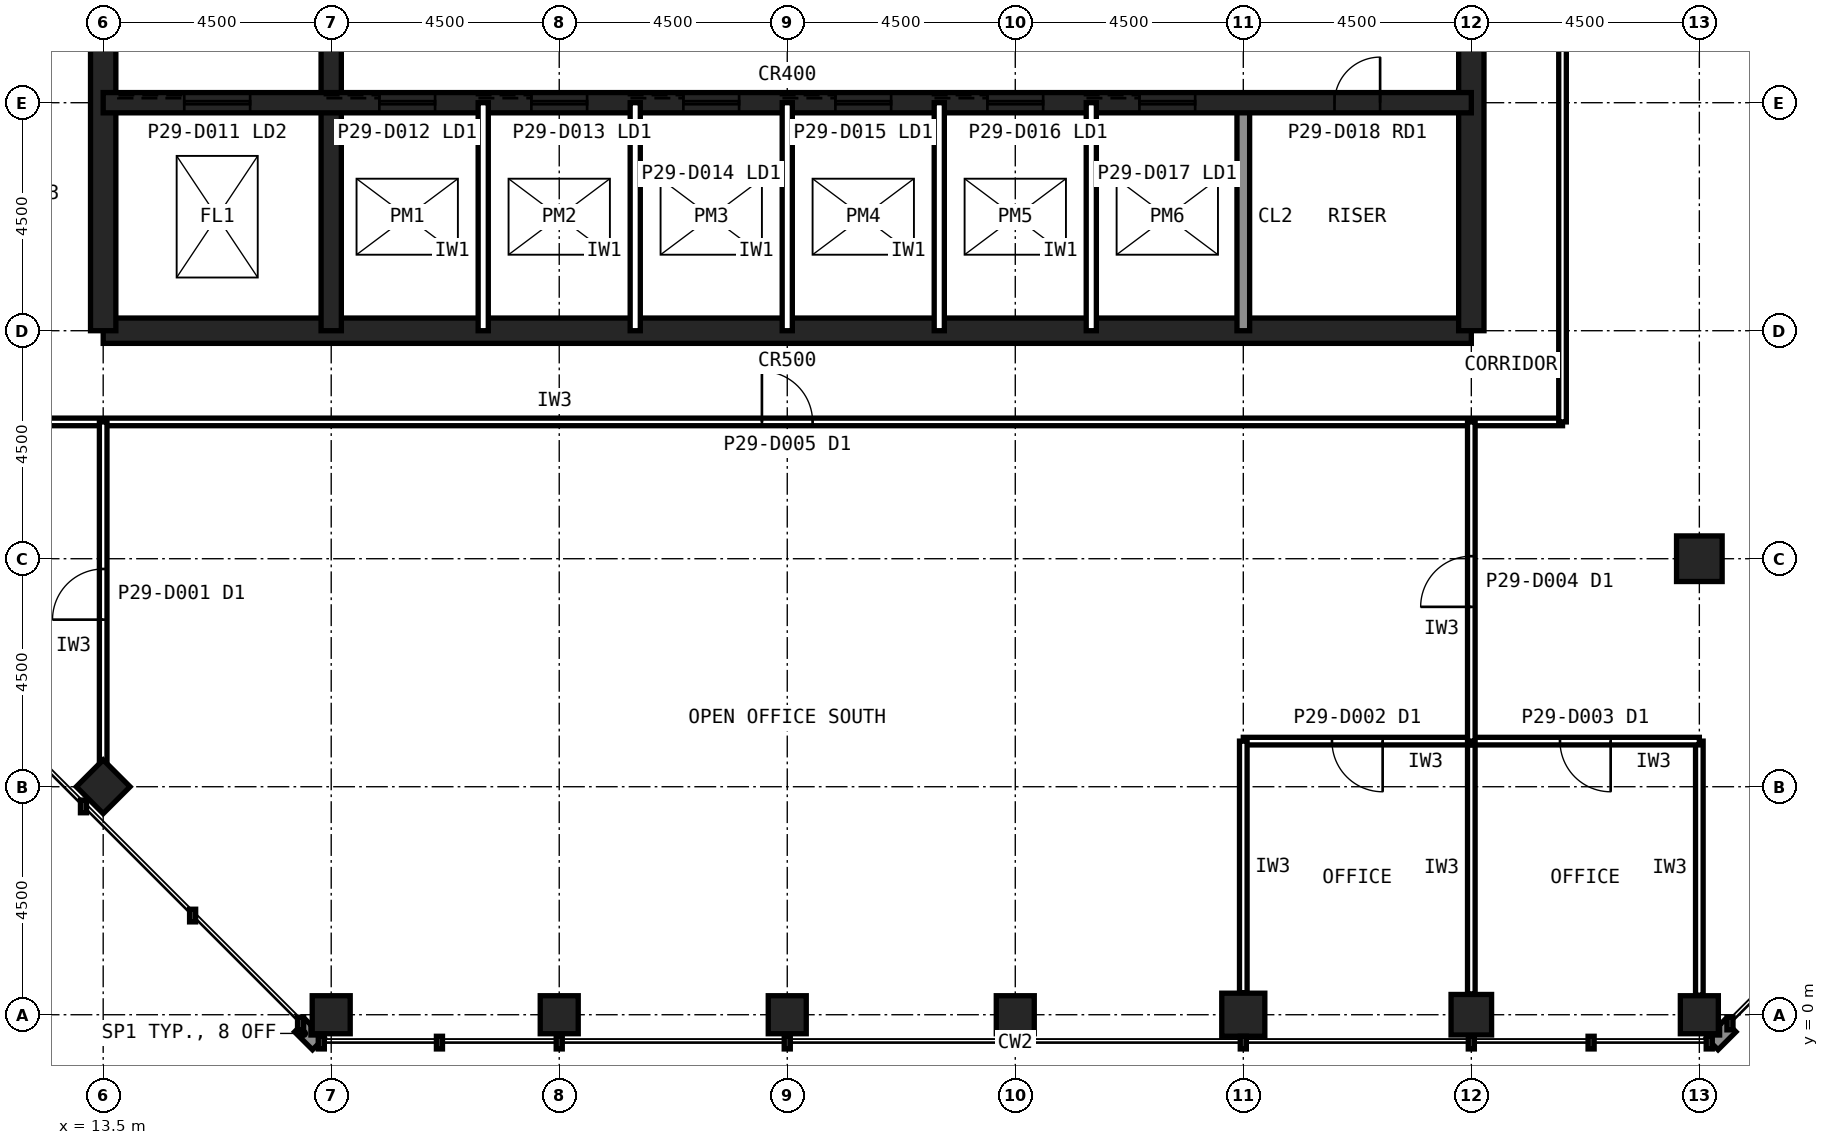
"""IFC4 building model, lengths in metres.
Left out: names, types, materials, properties, quantities, classifications, styles, units other than length and angle.
Written with IfcOpenShell. Run it as: python <this file> out.ifc"""

import sys

from ifc_helpers import new_model, si_unit, direction, frame, frame_2d, origin, origin_2d, place, context, subcontext, project, spatial, rectangle, hollow_rectangle, extrude, element, fill, save


model = new_model("IFC4")
c1 = context("Model", 3, precision=1e-05, world=origin(), true_north=direction((0.0, 1.0)))
c2 = subcontext(c1, "Body", "Model", "MODEL_VIEW")
j1 = project(units=[si_unit("LENGTHUNIT", "METRE"), si_unit("PLANEANGLEUNIT", "RADIAN")], contexts=[c1])
p1 = place(None, origin())
s1 = spatial("IfcSite", under=j1, at=p1, CompositionType="ELEMENT")
p2 = place(p1, origin())
s2 = spatial("IfcBuilding", under=s1, at=p2, CompositionType="ELEMENT")
p3 = place(p2, frame((0.0, 0.0, 127.6)))
s3 = spatial("IfcBuildingStorey", under=s2, at=p3, CompositionType="ELEMENT", Elevation=127.6)
for number, where, z_axis, x_axis in (
    (1, (18.0, 0.0, 0.0), (0.0, 0.0, 1.0), (1.0, 0.0, 0.0)),
    (2, (22.5, 0.0, 0.0), (0.0, 0.0, 1.0), (1.0, 0.0, 0.0)),
    (3, (27.0, 0.0, 0.0), (0.0, 0.0, 1.0), (1.0, 0.0, 0.0)),
    (4, (31.5, 0.0, 0.0), (0.0, 0.0, 1.0), (1.0, 0.0, 0.0)),
):
    element("IfcColumn", number, at=place(p3, frame(where, z_axis=z_axis, x_axis=x_axis)), inside=s3, PredefinedType="COLUMN", context=c2, shape_type="SweptSolid", body=[
        extrude(hollow_rectangle(XDim=0.75, YDim=0.75, WallThickness=0.04, at=origin_2d()), origin(), (0.0, 0.0, 1.0), 4.0),
    ])
p4 = place(p3, frame((36.0, 0.0, 0.0), z_axis=(0.0, 0.0, 1.0), x_axis=(1.0, 0.0, 0.0)))
e5 = element("IfcColumn", 5, at=p4, inside=s3, PredefinedType="COLUMN", context=c2, shape_type="SweptSolid", body=[
    extrude(hollow_rectangle(XDim=0.85, YDim=0.85, WallThickness=0.05, at=origin_2d()), origin(), (0.0, 0.0, 1.0), 4.0),
])
p5 = place(p3, frame((40.5, 0.0, 0.0), z_axis=(0.0, 0.0, 1.0), x_axis=(1.0, 0.0, 0.0)))
e6 = element("IfcColumn", 6, at=p5, inside=s3, PredefinedType="COLUMN", context=c2, shape_type="SweptSolid", body=[
    extrude(hollow_rectangle(XDim=0.8, YDim=0.8, WallThickness=0.045, at=origin_2d()), origin(), (0.0, 0.0, 1.0), 4.0),
])
for number, where, z_axis, x_axis in (
    (7, (45.0, 0.0, 0.0), (0.0, 0.0, 1.0), (1.0, 0.0, 0.0)),
    (8, (13.5, 4.5, 0.0), (0.0, 0.0, 1.0), (0.707, 0.707, 0.0)),
):
    element("IfcColumn", number, at=place(p3, frame(where, z_axis=z_axis, x_axis=x_axis)), inside=s3, PredefinedType="COLUMN", context=c2, shape_type="SweptSolid", body=[
        extrude(hollow_rectangle(XDim=0.75, YDim=0.75, WallThickness=0.04, at=origin_2d()), origin(), (0.0, 0.0, 1.0), 4.0),
    ])
p6 = place(p3, frame((45.0, 9.0, 0.0), z_axis=(0.0, 0.0, 1.0), x_axis=(1.0, 0.0, 0.0)))
e9 = element("IfcColumn", 9, at=p6, inside=s3, PredefinedType="COLUMN", context=c2, shape_type="SweptSolid", body=[
    extrude(hollow_rectangle(XDim=0.9, YDim=0.9, WallThickness=0.063, at=origin_2d()), origin(), (0.0, 0.0, 1.0), 4.0),
])
p7 = place(p3, frame((13.5, 13.5, 0.0), z_axis=(0.0, 0.0, 1.0), x_axis=(1.0, 0.0, 0.0)))
e10 = element("IfcWall", 10, at=p7, inside=s3, PredefinedType="SHEAR", context=c2, shape_type="SweptSolid", body=[
    extrude(rectangle(XDim=27.0, YDim=0.5, at=frame_2d((13.5, 0.0))), origin(), (0.0, 0.0, 1.0), 4.0),
])
p8 = place(p3, frame((40.5, 13.5, 0.0), z_axis=(0.0, 0.0, 1.0), x_axis=(0.0, 1.0, 0.0)))
e11 = element("IfcWall", 11, at=p8, inside=s3, PredefinedType="SHEAR", context=c2, shape_type="SweptSolid", body=[
    extrude(rectangle(XDim=27.0, YDim=0.5, at=frame_2d((13.5, 0.0))), origin(), (0.0, 0.0, 1.0), 4.0),
])
p9 = place(p8, frame((5.85, 0.0, 0.0)))
e12 = element("IfcOpeningElement", 12, at=p9, cuts=e11, PredefinedType="OPENING", context=c2, shape_type="SweptSolid", body=[
    extrude(rectangle(XDim=1.8, YDim=2.1, at=frame_2d((0.9, 1.05))), frame((0.0, 0.26, 0.0), z_axis=(0.0, -1.0, 0.0), x_axis=(1.0, 0.0, 0.0)), (0.0, 0.0, 1.0), 0.52),
])
p10 = place(p8, frame((19.65, 0.0, 0.0)))
e13 = element("IfcOpeningElement", 13, at=p10, cuts=e11, PredefinedType="OPENING", context=c2, shape_type="SweptSolid", body=[
    extrude(rectangle(XDim=1.2, YDim=2.1, at=frame_2d((0.6, 1.05))), frame((0.0, 0.26, 0.0), z_axis=(0.0, -1.0, 0.0), x_axis=(1.0, 0.0, 0.0)), (0.0, 0.0, 1.0), 0.52),
])
p11 = place(p3, frame((13.5, 40.5, 0.0), z_axis=(0.0, 0.0, 1.0), x_axis=(0.0, -1.0, 0.0)))
e14 = element("IfcWall", 14, at=p11, inside=s3, PredefinedType="SHEAR", context=c2, shape_type="SweptSolid", body=[
    extrude(rectangle(XDim=27.0, YDim=0.5, at=frame_2d((13.5, 0.0))), origin(), (0.0, 0.0, 1.0), 4.0),
])
p12 = place(p11, frame((19.65, 0.0, 0.0)))
e15 = element("IfcOpeningElement", 15, at=p12, cuts=e14, PredefinedType="OPENING", context=c2, shape_type="SweptSolid", body=[
    extrude(rectangle(XDim=1.2, YDim=2.1, at=frame_2d((0.6, 1.05))), frame((0.0, 0.26, 0.0), z_axis=(0.0, -1.0, 0.0), x_axis=(1.0, 0.0, 0.0)), (0.0, 0.0, 1.0), 0.52),
])
p13 = place(p11, frame((5.85, 0.0, 0.0)))
e16 = element("IfcOpeningElement", 16, at=p13, cuts=e14, PredefinedType="OPENING", context=c2, shape_type="SweptSolid", body=[
    extrude(rectangle(XDim=1.8, YDim=2.1, at=frame_2d((0.9, 1.05))), frame((0.0, 0.26, 0.0), z_axis=(0.0, -1.0, 0.0), x_axis=(1.0, 0.0, 0.0)), (0.0, 0.0, 1.0), 0.52),
])
p14 = place(p3, frame((18.0, 13.5, 0.0), z_axis=(0.0, 0.0, 1.0), x_axis=(0.0, 1.0, 0.0)))
e17 = element("IfcWall", 17, at=p14, inside=s3, PredefinedType="SHEAR", context=c2, shape_type="SweptSolid", body=[
    extrude(rectangle(XDim=18.0, YDim=0.4, at=frame_2d((9.0, 0.0))), origin(), (0.0, 0.0, 1.0), 4.0),
])
p15 = place(p3, frame((36.0, 13.5, 0.0), z_axis=(0.0, 0.0, 1.0), x_axis=(0.0, 1.0, 0.0)))
e18 = element("IfcWall", 18, at=p15, inside=s3, PredefinedType="SOLIDWALL", context=c2, shape_type="SweptSolid", body=[
    extrude(rectangle(XDim=4.5, YDim=0.25, at=frame_2d((2.25, 0.0))), origin(), (0.0, 0.0, 1.0), 3.84),
])
p16 = place(p3, frame((13.5, 18.0, 0.0), z_axis=(0.0, 0.0, 1.0), x_axis=(1.0, 0.0, 0.0)))
e19 = element("IfcWall", 19, at=p16, inside=s3, PredefinedType="SHEAR", context=c2, shape_type="SweptSolid", body=[
    extrude(rectangle(XDim=27.0, YDim=0.4, at=frame_2d((13.5, 0.0))), origin(), (0.0, 0.0, 1.0), 4.0),
])
p17 = place(p16, frame((24.3, 0.0, 0.0)))
e20 = element("IfcOpeningElement", 20, at=p17, cuts=e19, PredefinedType="OPENING", context=c2, shape_type="SweptSolid", body=[
    extrude(rectangle(XDim=0.9, YDim=2.1, at=frame_2d((0.45, 1.05))), frame((0.0, 0.21, 0.0), z_axis=(0.0, -1.0, 0.0), x_axis=(1.0, 0.0, 0.0)), (0.0, 0.0, 1.0), 0.42),
])
p18 = place(p16, frame((5.45, 0.0, 0.0)))
e21 = element("IfcOpeningElement", 21, at=p18, cuts=e19, PredefinedType="OPENING", context=c2, shape_type="SweptSolid", body=[
    extrude(rectangle(XDim=1.1, YDim=2.1, at=frame_2d((0.55, 1.05))), frame((0.0, 0.21, 0.0), z_axis=(0.0, -1.0, 0.0), x_axis=(1.0, 0.0, 0.0)), (0.0, 0.0, 1.0), 0.42),
])
p19 = place(p16, frame((8.45, 0.0, 0.0)))
e22 = element("IfcOpeningElement", 22, at=p19, cuts=e19, PredefinedType="OPENING", context=c2, shape_type="SweptSolid", body=[
    extrude(rectangle(XDim=1.1, YDim=2.1, at=frame_2d((0.55, 1.05))), frame((0.0, 0.21, 0.0), z_axis=(0.0, -1.0, 0.0), x_axis=(1.0, 0.0, 0.0)), (0.0, 0.0, 1.0), 0.42),
])
p20 = place(p16, frame((11.45, 0.0, 0.0)))
e23 = element("IfcOpeningElement", 23, at=p20, cuts=e19, PredefinedType="OPENING", context=c2, shape_type="SweptSolid", body=[
    extrude(rectangle(XDim=1.1, YDim=2.1, at=frame_2d((0.55, 1.05))), frame((0.0, 0.21, 0.0), z_axis=(0.0, -1.0, 0.0), x_axis=(1.0, 0.0, 0.0)), (0.0, 0.0, 1.0), 0.42),
])
p21 = place(p16, frame((14.45, 0.0, 0.0)))
e24 = element("IfcOpeningElement", 24, at=p21, cuts=e19, PredefinedType="OPENING", context=c2, shape_type="SweptSolid", body=[
    extrude(rectangle(XDim=1.1, YDim=2.1, at=frame_2d((0.55, 1.05))), frame((0.0, 0.21, 0.0), z_axis=(0.0, -1.0, 0.0), x_axis=(1.0, 0.0, 0.0)), (0.0, 0.0, 1.0), 0.42),
])
p22 = place(p16, frame((17.45, 0.0, 0.0)))
e25 = element("IfcOpeningElement", 25, at=p22, cuts=e19, PredefinedType="OPENING", context=c2, shape_type="SweptSolid", body=[
    extrude(rectangle(XDim=1.1, YDim=2.1, at=frame_2d((0.55, 1.05))), frame((0.0, 0.21, 0.0), z_axis=(0.0, -1.0, 0.0), x_axis=(1.0, 0.0, 0.0)), (0.0, 0.0, 1.0), 0.42),
])
p23 = place(p16, frame((20.45, 0.0, 0.0)))
e26 = element("IfcOpeningElement", 26, at=p23, cuts=e19, PredefinedType="OPENING", context=c2, shape_type="SweptSolid", body=[
    extrude(rectangle(XDim=1.1, YDim=2.1, at=frame_2d((0.55, 1.05))), frame((0.0, 0.21, 0.0), z_axis=(0.0, -1.0, 0.0), x_axis=(1.0, 0.0, 0.0)), (0.0, 0.0, 1.0), 0.42),
])
p24 = place(p16, frame((1.6, 0.0, 0.0)))
e27 = element("IfcOpeningElement", 27, at=p24, cuts=e19, PredefinedType="OPENING", context=c2, shape_type="SweptSolid", body=[
    extrude(rectangle(XDim=1.3, YDim=2.2, at=frame_2d((0.65, 1.1))), frame((0.0, 0.21, 0.0), z_axis=(0.0, -1.0, 0.0), x_axis=(1.0, 0.0, 0.0)), (0.0, 0.0, 1.0), 0.42),
])
for number, where, z_axis, x_axis in (
    (28, (21.0, 13.5, 0.0), (0.0, 0.0, 1.0), (0.0, 1.0, 0.0)),
    (29, (24.0, 13.5, 0.0), (0.0, 0.0, 1.0), (0.0, 1.0, 0.0)),
    (30, (27.0, 13.5, 0.0), (0.0, 0.0, 1.0), (0.0, 1.0, 0.0)),
    (31, (30.0, 13.5, 0.0), (0.0, 0.0, 1.0), (0.0, 1.0, 0.0)),
    (32, (33.0, 13.5, 0.0), (0.0, 0.0, 1.0), (0.0, 1.0, 0.0)),
):
    element("IfcWall", number, at=place(p3, frame(where, z_axis=z_axis, x_axis=x_axis)), inside=s3, PredefinedType="PARTITIONING", context=c2, shape_type="SweptSolid", body=[
        extrude(rectangle(XDim=4.5, YDim=0.2, at=frame_2d((2.25, 0.0))), origin(), (0.0, 0.0, 1.0), 3.84),
    ])
p25 = place(p3, frame((11.7, 11.7, 0.0), z_axis=(0.0, 0.0, 1.0), x_axis=(1.0, 0.0, 0.0)))
e33 = element("IfcWall", 33, at=p25, inside=s3, PredefinedType="PARTITIONING", context=c2, shape_type="SweptSolid", body=[
    extrude(rectangle(XDim=30.6, YDim=0.15, at=frame_2d((15.3, 0.0))), origin(), (0.0, 0.0, 1.0), 3.84),
])
p26 = place(p25, frame((14.8, 0.0, 0.0)))
e34 = element("IfcOpeningElement", 34, at=p26, cuts=e33, PredefinedType="OPENING", context=c2, shape_type="SweptSolid", body=[
    extrude(rectangle(XDim=1.0, YDim=2.1, at=frame_2d((0.5, 1.05))), frame((0.0, 0.085, 0.0), z_axis=(0.0, -1.0, 0.0), x_axis=(1.0, 0.0, 0.0)), (0.0, 0.0, 1.0), 0.17),
])
p27 = place(p3, frame((42.3, 11.7, 0.0), z_axis=(0.0, 0.0, 1.0), x_axis=(0.0, 1.0, 0.0)))
e35 = element("IfcWall", 35, at=p27, inside=s3, PredefinedType="PARTITIONING", context=c2, shape_type="SweptSolid", body=[
    extrude(rectangle(XDim=28.8, YDim=0.15, at=frame_2d((14.4, 0.0))), origin(), (0.0, 0.0, 1.0), 3.84),
])
p28 = place(p27, frame((13.9, 0.0, 0.0)))
e36 = element("IfcOpeningElement", 36, at=p28, cuts=e35, PredefinedType="OPENING", context=c2, shape_type="SweptSolid", body=[
    extrude(rectangle(XDim=1.0, YDim=2.1, at=frame_2d((0.5, 1.05))), frame((0.0, 0.085, 0.0), z_axis=(0.0, -1.0, 0.0), x_axis=(1.0, 0.0, 0.0)), (0.0, 0.0, 1.0), 0.17),
])
p29 = place(p3, frame((40.5, 0.41, 0.0), z_axis=(0.0, 0.0, 1.0), x_axis=(0.0, 1.0, 0.0)))
e37 = element("IfcWall", 37, at=p29, inside=s3, PredefinedType="PARTITIONING", context=c2, shape_type="SweptSolid", body=[
    extrude(rectangle(XDim=4.99, YDim=0.15, at=frame_2d((2.495, 0.0))), origin(), (0.0, 0.0, 1.0), 2.989),
])
p30 = place(p3, frame((40.5, 5.4, 0.0), z_axis=(0.0, 0.0, 1.0), x_axis=(-1.0, 0.0, 0.0)))
e38 = element("IfcWall", 38, at=p30, inside=s3, PredefinedType="PARTITIONING", context=c2, shape_type="SweptSolid", body=[
    extrude(rectangle(XDim=4.5, YDim=0.15, at=frame_2d((2.25, 0.0))), origin(), (0.0, 0.0, 1.0), 3.84),
])
p31 = place(p30, frame((1.75, 0.0, 0.0)))
e39 = element("IfcOpeningElement", 39, at=p31, cuts=e38, PredefinedType="OPENING", context=c2, shape_type="SweptSolid", body=[
    extrude(rectangle(XDim=1.0, YDim=2.1, at=frame_2d((0.5, 1.05))), frame((0.0, 0.085, 0.0), z_axis=(0.0, -1.0, 0.0), x_axis=(1.0, 0.0, 0.0)), (0.0, 0.0, 1.0), 0.17),
])
p32 = place(p3, frame((36.0, 5.4, 0.0), z_axis=(0.0, 0.0, 1.0), x_axis=(0.0, -1.0, 0.0)))
e40 = element("IfcWall", 40, at=p32, inside=s3, PredefinedType="PARTITIONING", context=c2, shape_type="SweptSolid", body=[
    extrude(rectangle(XDim=4.965, YDim=0.15, at=frame_2d((2.482, 0.0))), origin(), (0.0, 0.0, 1.0), 2.989),
])
p33 = place(p3, frame((45.0, 0.385, 0.0), z_axis=(0.0, 0.0, 1.0), x_axis=(0.0, 1.0, 0.0)))
e41 = element("IfcWall", 41, at=p33, inside=s3, PredefinedType="PARTITIONING", context=c2, shape_type="SweptSolid", body=[
    extrude(rectangle(XDim=5.015, YDim=0.15, at=frame_2d((2.507, 0.0))), origin(), (0.0, 0.0, 1.0), 3.229),
])
p34 = place(p3, frame((45.0, 5.4, 0.0), z_axis=(0.0, 0.0, 1.0), x_axis=(-1.0, 0.0, 0.0)))
e42 = element("IfcWall", 42, at=p34, inside=s3, PredefinedType="PARTITIONING", context=c2, shape_type="SweptSolid", body=[
    extrude(rectangle(XDim=4.5, YDim=0.15, at=frame_2d((2.25, 0.0))), origin(), (0.0, 0.0, 1.0), 3.84),
])
p35 = place(p34, frame((1.75, 0.0, 0.0)))
e43 = element("IfcOpeningElement", 43, at=p35, cuts=e42, PredefinedType="OPENING", context=c2, shape_type="SweptSolid", body=[
    extrude(rectangle(XDim=1.0, YDim=2.1, at=frame_2d((0.5, 1.05))), frame((0.0, 0.085, 0.0), z_axis=(0.0, -1.0, 0.0), x_axis=(1.0, 0.0, 0.0)), (0.0, 0.0, 1.0), 0.17),
])
p36 = place(p3, frame((40.5, 5.4, 0.0), z_axis=(0.0, 0.0, 1.0), x_axis=(0.0, 1.0, 0.0)))
e44 = element("IfcWall", 44, at=p36, inside=s3, PredefinedType="PARTITIONING", context=c2, shape_type="SweptSolid", body=[
    extrude(rectangle(XDim=6.3, YDim=0.15, at=frame_2d((3.15, 0.0))), origin(), (0.0, 0.0, 1.0), 2.989),
])
p37 = place(p36, frame((2.65, 0.0, 0.0)))
e45 = element("IfcOpeningElement", 45, at=p37, cuts=e44, PredefinedType="OPENING", context=c2, shape_type="SweptSolid", body=[
    extrude(rectangle(XDim=1.0, YDim=2.1, at=frame_2d((0.5, 1.05))), frame((0.0, 0.085, 0.0), z_axis=(0.0, -1.0, 0.0), x_axis=(1.0, 0.0, 0.0)), (0.0, 0.0, 1.0), 0.17),
])
p38 = place(p3, frame((13.5, 4.895, 0.0), z_axis=(0.0, 0.0, 1.0), x_axis=(0.0, 1.0, 0.0)))
e46 = element("IfcWall", 46, at=p38, inside=s3, PredefinedType="PARTITIONING", context=c2, shape_type="SweptSolid", body=[
    extrude(rectangle(XDim=6.805, YDim=0.15, at=frame_2d((3.402, 0.0))), origin(), (0.0, 0.0, 1.0), 2.989),
])
p39 = place(p38, frame((2.903, 0.0, 0.0)))
e47 = element("IfcOpeningElement", 47, at=p39, cuts=e46, PredefinedType="OPENING", context=c2, shape_type="SweptSolid", body=[
    extrude(rectangle(XDim=1.0, YDim=2.1, at=frame_2d((0.5, 1.05))), frame((0.0, 0.085, 0.0), z_axis=(0.0, -1.0, 0.0), x_axis=(1.0, 0.0, 0.0)), (0.0, 0.0, 1.0), 0.17),
])
p40 = place(p17, origin())
e48 = element("IfcDoor", 48, at=p40, inside=s3, OperationType="SINGLE_SWING_RIGHT", PredefinedType="DOOR", context=c2, shape_type="SweptSolid", body=[
    extrude(rectangle(XDim=0.9, YDim=2.1, at=frame_2d((0.45, 1.05))), frame((0.0, 0.025, 0.0), z_axis=(0.0, -1.0, 0.0), x_axis=(1.0, 0.0, 0.0)), (0.0, 0.0, 1.0), 0.05),
])
fill(e20, e48)
p41 = place(p18, origin())
e49 = element("IfcDoor", 49, at=p41, inside=s3, OperationType="SLIDING_TO_LEFT", PredefinedType="DOOR", context=c2, shape_type="SweptSolid", body=[
    extrude(rectangle(XDim=1.1, YDim=2.1, at=frame_2d((0.55, 1.05))), frame((0.0, 0.025, 0.0), z_axis=(0.0, -1.0, 0.0), x_axis=(1.0, 0.0, 0.0)), (0.0, 0.0, 1.0), 0.05),
])
fill(e21, e49)
p42 = place(p19, origin())
e50 = element("IfcDoor", 50, at=p42, inside=s3, OperationType="SLIDING_TO_LEFT", PredefinedType="DOOR", context=c2, shape_type="SweptSolid", body=[
    extrude(rectangle(XDim=1.1, YDim=2.1, at=frame_2d((0.55, 1.05))), frame((0.0, 0.025, 0.0), z_axis=(0.0, -1.0, 0.0), x_axis=(1.0, 0.0, 0.0)), (0.0, 0.0, 1.0), 0.05),
])
fill(e22, e50)
p43 = place(p20, origin())
e51 = element("IfcDoor", 51, at=p43, inside=s3, OperationType="SLIDING_TO_LEFT", PredefinedType="DOOR", context=c2, shape_type="SweptSolid", body=[
    extrude(rectangle(XDim=1.1, YDim=2.1, at=frame_2d((0.55, 1.05))), frame((0.0, 0.025, 0.0), z_axis=(0.0, -1.0, 0.0), x_axis=(1.0, 0.0, 0.0)), (0.0, 0.0, 1.0), 0.05),
])
fill(e23, e51)
p44 = place(p21, origin())
e52 = element("IfcDoor", 52, at=p44, inside=s3, OperationType="SLIDING_TO_LEFT", PredefinedType="DOOR", context=c2, shape_type="SweptSolid", body=[
    extrude(rectangle(XDim=1.1, YDim=2.1, at=frame_2d((0.55, 1.05))), frame((0.0, 0.025, 0.0), z_axis=(0.0, -1.0, 0.0), x_axis=(1.0, 0.0, 0.0)), (0.0, 0.0, 1.0), 0.05),
])
fill(e24, e52)
p45 = place(p22, origin())
e53 = element("IfcDoor", 53, at=p45, inside=s3, OperationType="SLIDING_TO_LEFT", PredefinedType="DOOR", context=c2, shape_type="SweptSolid", body=[
    extrude(rectangle(XDim=1.1, YDim=2.1, at=frame_2d((0.55, 1.05))), frame((0.0, 0.025, 0.0), z_axis=(0.0, -1.0, 0.0), x_axis=(1.0, 0.0, 0.0)), (0.0, 0.0, 1.0), 0.05),
])
fill(e25, e53)
p46 = place(p23, origin())
e54 = element("IfcDoor", 54, at=p46, inside=s3, OperationType="SLIDING_TO_LEFT", PredefinedType="DOOR", context=c2, shape_type="SweptSolid", body=[
    extrude(rectangle(XDim=1.1, YDim=2.1, at=frame_2d((0.55, 1.05))), frame((0.0, 0.025, 0.0), z_axis=(0.0, -1.0, 0.0), x_axis=(1.0, 0.0, 0.0)), (0.0, 0.0, 1.0), 0.05),
])
fill(e26, e54)
p47 = place(p24, origin())
e55 = element("IfcDoor", 55, at=p47, inside=s3, OperationType="SLIDING_TO_LEFT", PredefinedType="DOOR", context=c2, shape_type="SweptSolid", body=[
    extrude(rectangle(XDim=1.3, YDim=2.2, at=frame_2d((0.65, 1.1))), frame((0.0, 0.025, 0.0), z_axis=(0.0, -1.0, 0.0), x_axis=(1.0, 0.0, 0.0)), (0.0, 0.0, 1.0), 0.05),
])
fill(e27, e55)
p48 = place(p26, origin())
e56 = element("IfcDoor", 56, at=p48, inside=s3, OperationType="SINGLE_SWING_LEFT", PredefinedType="DOOR", context=c2, shape_type="SweptSolid", body=[
    extrude(rectangle(XDim=1.0, YDim=2.1, at=frame_2d((0.5, 1.05))), frame((0.0, 0.025, 0.0), z_axis=(0.0, -1.0, 0.0), x_axis=(1.0, 0.0, 0.0)), (0.0, 0.0, 1.0), 0.05),
])
fill(e34, e56)
p49 = place(p31, origin())
e57 = element("IfcDoor", 57, at=p49, inside=s3, OperationType="SINGLE_SWING_LEFT", PredefinedType="DOOR", context=c2, shape_type="SweptSolid", body=[
    extrude(rectangle(XDim=1.0, YDim=2.1, at=frame_2d((0.5, 1.05))), frame((0.0, 0.025, 0.0), z_axis=(0.0, -1.0, 0.0), x_axis=(1.0, 0.0, 0.0)), (0.0, 0.0, 1.0), 0.05),
])
fill(e39, e57)
p50 = place(p35, origin())
e58 = element("IfcDoor", 58, at=p50, inside=s3, OperationType="SINGLE_SWING_LEFT", PredefinedType="DOOR", context=c2, shape_type="SweptSolid", body=[
    extrude(rectangle(XDim=1.0, YDim=2.1, at=frame_2d((0.5, 1.05))), frame((0.0, 0.025, 0.0), z_axis=(0.0, -1.0, 0.0), x_axis=(1.0, 0.0, 0.0)), (0.0, 0.0, 1.0), 0.05),
])
fill(e43, e58)
p51 = place(p37, origin())
e59 = element("IfcDoor", 59, at=p51, inside=s3, OperationType="SINGLE_SWING_LEFT", PredefinedType="DOOR", context=c2, shape_type="SweptSolid", body=[
    extrude(rectangle(XDim=1.0, YDim=2.1, at=frame_2d((0.5, 1.05))), frame((0.0, 0.025, 0.0), z_axis=(0.0, -1.0, 0.0), x_axis=(1.0, 0.0, 0.0)), (0.0, 0.0, 1.0), 0.05),
])
fill(e45, e59)
p52 = place(p39, origin())
e60 = element("IfcDoor", 60, at=p52, inside=s3, OperationType="SINGLE_SWING_LEFT", PredefinedType="DOOR", context=c2, shape_type="SweptSolid", body=[
    extrude(rectangle(XDim=1.0, YDim=2.1, at=frame_2d((0.5, 1.05))), frame((0.0, 0.025, 0.0), z_axis=(0.0, -1.0, 0.0), x_axis=(1.0, 0.0, 0.0)), (0.0, 0.0, 1.0), 0.05),
])
fill(e47, e60)
save(model, sys.argv[1])
